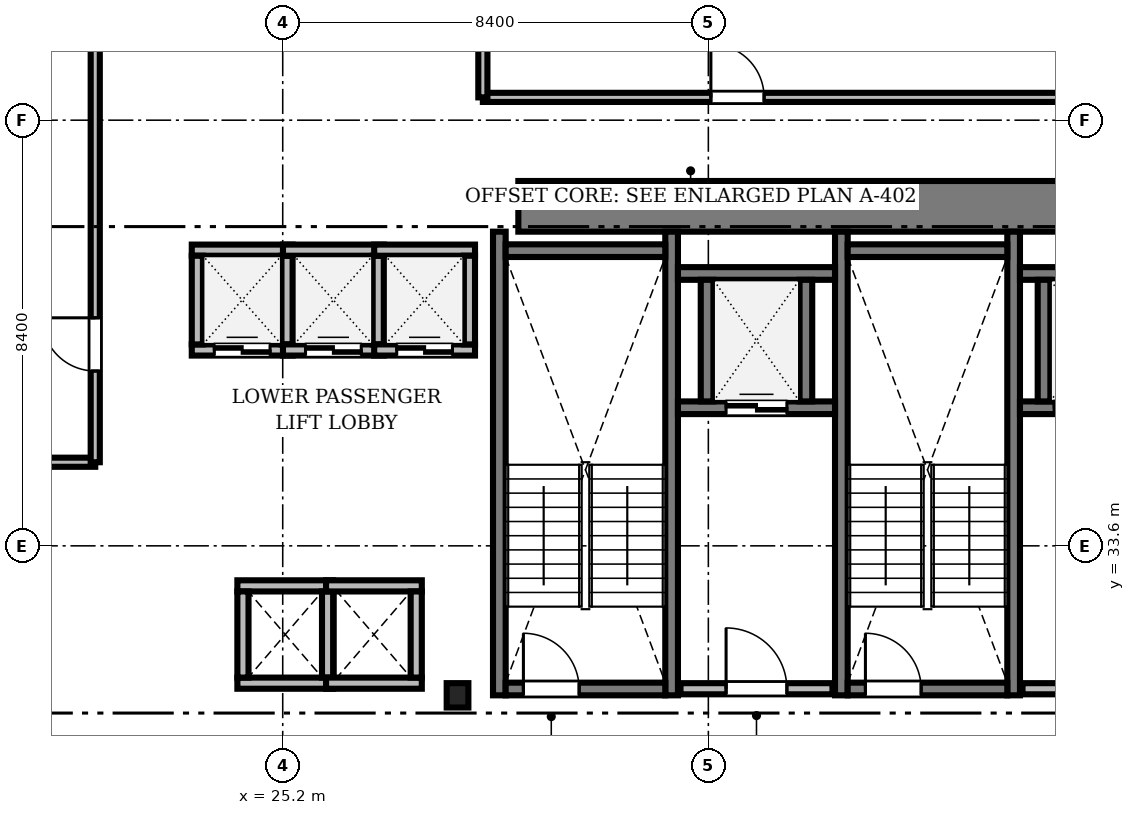
"""IFC4 building model, lengths in metres.
Left out: names, types, materials, properties, quantities, classifications, styles, units other than length and angle.
Written with IfcOpenShell. Run it as: python <this file> out.ifc"""

import sys

from ifc_helpers import new_model, si_unit, direction, frame, frame_2d, origin, origin_2d, place, context, subcontext, project, spatial, rectangle, i_section, extrude, source, transform, mapped, element, fill, save


model = new_model("IFC4")
c1 = context("Model", 3, precision=1e-05, world=origin(), true_north=direction((0.0, 1.0)))
c2 = subcontext(c1, "Body", "Model", "MODEL_VIEW")
j1 = project(units=[si_unit("LENGTHUNIT", "METRE"), si_unit("PLANEANGLEUNIT", "RADIAN")], contexts=[c1])
p1 = place(None, origin())
s1 = spatial("IfcSite", under=j1, at=p1, CompositionType="ELEMENT")
p2 = place(p1, origin())
s2 = spatial("IfcBuilding", under=s1, at=p2, CompositionType="ELEMENT")
p3 = place(p2, frame((0.0, 0.0, 86.0)))
s3 = spatial("IfcBuildingStorey", under=s2, at=p3, CompositionType="ELEMENT", Elevation=86.0)
m1 = source(origin(), c2, "Body", "SweptSolid", [
    extrude(rectangle(XDim=17.52, YDim=1.0, at=frame_2d((8.76, 0.0))), origin(), (0.0, 0.0, 1.0), 3.41),
])
p4 = place(p3, frame((29.85, 40.3, 0.0), z_axis=(0.0, 0.0, 1.0), x_axis=(1.0, 0.0, 0.0)))
e1 = element("IfcWall", 1, at=p4, inside=s3, PredefinedType="SHEAR", context=c2, shape_type="MappedRepresentation", body=[
    mapped(m1, transform((0.0, 0.0, 0.0), scale=1.0)),
])
m2 = source(origin(), c2, "Body", "SweptSolid", [
    extrude(i_section(OverallWidth=0.428, OverallDepth=0.481, WebThickness=0.04, FlangeThickness=0.063, FilletRadius=0.015, at=origin_2d()), origin(), (0.0, 0.0, 1.0), 3.41),
])
p5 = place(p3, frame((28.65, 30.65, 0.0), z_axis=(0.0, 0.0, 1.0), x_axis=(1.0, 0.0, 0.0)))
e2 = element("IfcColumn", 2, at=p5, inside=s3, PredefinedType="COLUMN", context=c2, shape_type="MappedRepresentation", body=[
    mapped(m2, transform((0.0, 0.0, 0.0), scale=1.0)),
])
m3 = source(origin(), c2, "Body", "SweptSolid", [
    extrude(rectangle(XDim=9.15, YDim=0.25, at=frame_2d((4.575, 0.0))), origin(), (0.0, 0.0, 1.0), 3.45),
])
for number, where, z_axis, x_axis in (
    (3, (29.475, 30.65, 0.0), (0.0, 0.0, 1.0), (0.0, 1.0, 0.0)),
    (4, (32.875, 30.65, 0.0), (0.0, 0.0, 1.0), (0.0, 1.0, 0.0)),
):
    element("IfcWall", number, at=place(p3, frame(where, z_axis=z_axis, x_axis=x_axis)), inside=s3, PredefinedType="SOLIDWALL", context=c2, shape_type="MappedRepresentation", body=[
        mapped(m3, transform((0.0, 0.0, 0.0), scale=1.0)),
    ])
m4 = source(origin(), c2, "Body", "SweptSolid", [
    extrude(rectangle(XDim=3.15, YDim=0.25, at=frame_2d((1.575, 0.0))), origin(), (0.0, 0.0, 1.0), 3.45),
])
p6 = place(p3, frame((29.6, 39.425, 0.0), z_axis=(0.0, 0.0, 1.0), x_axis=(1.0, 0.0, 0.0)))
e5 = element("IfcWall", 5, at=p6, inside=s3, PredefinedType="SOLIDWALL", context=c2, shape_type="MappedRepresentation", body=[
    mapped(m4, transform((0.0, 0.0, 0.0), scale=1.0)),
])
p7 = place(p3, frame((29.6, 30.775, 0.0), z_axis=(0.0, 0.0, 1.0), x_axis=(1.0, 0.0, 0.0)))
e6 = element("IfcWall", 6, at=p7, inside=s3, PredefinedType="SOLIDWALL", context=c2, shape_type="MappedRepresentation", body=[
    mapped(m4, transform((0.0, 0.0, 0.0), scale=1.0)),
])
m5 = source(origin(), c2, "Body", "SweptSolid", [
    extrude(rectangle(XDim=1.1, YDim=2.2, at=frame_2d((0.55, 1.1))), frame((0.0, 0.135, 0.0), z_axis=(0.0, -1.0, 0.0), x_axis=(1.0, 0.0, 0.0)), (0.0, 0.0, 1.0), 0.27),
])
p8 = place(p7, frame((0.35, 0.0, 0.0)))
e7 = element("IfcOpeningElement", 7, at=p8, cuts=e6, PredefinedType="OPENING", context=c2, shape_type="MappedRepresentation", body=[
    mapped(m5, transform((0.0, 0.0, 0.0), scale=1.0)),
])
for number, where, z_axis, x_axis in (
    (8, (36.225, 30.65, 0.0), (0.0, 0.0, 1.0), (0.0, 1.0, 0.0)),
    (9, (39.625, 30.65, 0.0), (0.0, 0.0, 1.0), (0.0, 1.0, 0.0)),
):
    element("IfcWall", number, at=place(p3, frame(where, z_axis=z_axis, x_axis=x_axis)), inside=s3, PredefinedType="SOLIDWALL", context=c2, shape_type="MappedRepresentation", body=[
        mapped(m3, transform((0.0, 0.0, 0.0), scale=1.0)),
    ])
p9 = place(p3, frame((36.35, 39.425, 0.0), z_axis=(0.0, 0.0, 1.0), x_axis=(1.0, 0.0, 0.0)))
e10 = element("IfcWall", 10, at=p9, inside=s3, PredefinedType="SOLIDWALL", context=c2, shape_type="MappedRepresentation", body=[
    mapped(m4, transform((0.0, 0.0, 0.0), scale=1.0)),
])
p10 = place(p3, frame((36.35, 30.775, 0.0), z_axis=(0.0, 0.0, 1.0), x_axis=(1.0, 0.0, 0.0)))
e11 = element("IfcWall", 11, at=p10, inside=s3, PredefinedType="SOLIDWALL", context=c2, shape_type="MappedRepresentation", body=[
    mapped(m4, transform((0.0, 0.0, 0.0), scale=1.0)),
])
p11 = place(p10, frame((0.35, 0.0, 0.0)))
e12 = element("IfcOpeningElement", 12, at=p11, cuts=e11, PredefinedType="OPENING", context=c2, shape_type="MappedRepresentation", body=[
    mapped(m5, transform((0.0, 0.0, 0.0), scale=1.0)),
])
m6 = source(origin(), c2, "Body", "SweptSolid", [
    extrude(rectangle(XDim=3.0, YDim=0.22, at=frame_2d((1.5, 0.0))), origin(), (0.0, 0.0, 1.0), 3.41),
])
p12 = place(p3, frame((33.05, 30.78, 0.0), z_axis=(0.0, 0.0, 1.0), x_axis=(1.0, 0.0, 0.0)))
e13 = element("IfcWall", 13, at=p12, inside=s3, PredefinedType="SOLIDWALL", context=c2, shape_type="MappedRepresentation", body=[
    mapped(m6, transform((0.0, 0.0, 0.0), scale=1.0)),
])
m7 = source(origin(), c2, "Body", "SweptSolid", [
    extrude(rectangle(XDim=1.2, YDim=2.2, at=frame_2d((0.6, 1.1))), frame((0.0, 0.12, 0.0), z_axis=(0.0, -1.0, 0.0), x_axis=(1.0, 0.0, 0.0)), (0.0, 0.0, 1.0), 0.24),
])
p13 = place(p12, frame((0.9, 0.0, 0.0)))
e14 = element("IfcOpeningElement", 14, at=p13, cuts=e13, PredefinedType="OPENING", context=c2, shape_type="MappedRepresentation", body=[
    mapped(m7, transform((0.0, 0.0, 0.0), scale=1.0)),
])
m8 = source(origin(), c2, "Body", "SweptSolid", [
    extrude(rectangle(XDim=2.8, YDim=0.22, at=frame_2d((1.4, 0.0))), origin(), (0.0, 0.0, 1.0), 3.41),
])
p14 = place(p3, frame((39.8, 30.78, 0.0), z_axis=(0.0, 0.0, 1.0), x_axis=(1.0, 0.0, 0.0)))
e15 = element("IfcWall", 15, at=p14, inside=s3, PredefinedType="SOLIDWALL", context=c2, shape_type="MappedRepresentation", body=[
    mapped(m8, transform((0.0, 0.0, 0.0), scale=1.0)),
])
p15 = place(p14, frame((0.8, 0.0, 0.0)))
e16 = element("IfcOpeningElement", 16, at=p15, cuts=e15, PredefinedType="OPENING", context=c2, shape_type="MappedRepresentation", body=[
    mapped(m7, transform((0.0, 0.0, 0.0), scale=1.0)),
])
m9 = source(origin(), c2, "Body", "SweptSolid", [
    extrude(rectangle(XDim=1.99, YDim=0.22, at=frame_2d((0.995, 0.0))), origin(), (0.0, 0.0, 1.0), 3.41),
])
p16 = place(p3, frame((23.405, 37.465, 0.0), z_axis=(0.0, 0.0, 1.0), x_axis=(1.0, 0.0, 0.0)))
e17 = element("IfcWall", 17, at=p16, inside=s3, PredefinedType="SOLIDWALL", context=c2, shape_type="MappedRepresentation", body=[
    mapped(m9, transform((0.0, 0.0, 0.0), scale=1.0)),
])
m10 = source(origin(), c2, "Body", "SweptSolid", [
    extrude(rectangle(XDim=1.1, YDim=2.2, at=frame_2d((0.55, 1.1))), frame((0.0, 0.12, 0.0), z_axis=(0.0, -1.0, 0.0), x_axis=(1.0, 0.0, 0.0)), (0.0, 0.0, 1.0), 0.24),
])
p17 = place(p16, frame((0.445, 0.0, 0.0)))
e18 = element("IfcOpeningElement", 18, at=p17, cuts=e17, PredefinedType="OPENING", context=c2, shape_type="MappedRepresentation", body=[
    mapped(m10, transform((0.0, 0.0, 0.0), scale=1.0)),
])
p18 = place(p3, frame((23.405, 39.435, 0.0), z_axis=(0.0, 0.0, 1.0), x_axis=(1.0, 0.0, 0.0)))
e19 = element("IfcWall", 19, at=p18, inside=s3, PredefinedType="SOLIDWALL", context=c2, shape_type="MappedRepresentation", body=[
    mapped(m9, transform((0.0, 0.0, 0.0), scale=1.0)),
])
m11 = source(origin(), c2, "Body", "SweptSolid", [
    extrude(rectangle(XDim=1.75, YDim=0.22, at=frame_2d((0.875, 0.0))), origin(), (0.0, 0.0, 1.0), 3.41),
])
for number, where, z_axis, x_axis in (
    (20, (23.515, 37.575, 0.0), (0.0, 0.0, 1.0), (0.0, 1.0, 0.0)),
    (21, (25.285, 37.575, 0.0), (0.0, 0.0, 1.0), (0.0, 1.0, 0.0)),
):
    element("IfcWall", number, at=place(p3, frame(where, z_axis=z_axis, x_axis=x_axis)), inside=s3, PredefinedType="SOLIDWALL", context=c2, shape_type="MappedRepresentation", body=[
        mapped(m11, transform((0.0, 0.0, 0.0), scale=1.0)),
    ])
p19 = place(p3, frame((25.205, 37.465, 0.0), z_axis=(0.0, 0.0, 1.0), x_axis=(1.0, 0.0, 0.0)))
e22 = element("IfcWall", 22, at=p19, inside=s3, PredefinedType="SOLIDWALL", context=c2, shape_type="MappedRepresentation", body=[
    mapped(m9, transform((0.0, 0.0, 0.0), scale=1.0)),
])
p20 = place(p19, frame((0.445, 0.0, 0.0)))
e23 = element("IfcOpeningElement", 23, at=p20, cuts=e22, PredefinedType="OPENING", context=c2, shape_type="MappedRepresentation", body=[
    mapped(m10, transform((0.0, 0.0, 0.0), scale=1.0)),
])
p21 = place(p3, frame((25.205, 39.435, 0.0), z_axis=(0.0, 0.0, 1.0), x_axis=(1.0, 0.0, 0.0)))
e24 = element("IfcWall", 24, at=p21, inside=s3, PredefinedType="SOLIDWALL", context=c2, shape_type="MappedRepresentation", body=[
    mapped(m9, transform((0.0, 0.0, 0.0), scale=1.0)),
])
p22 = place(p3, frame((27.085, 37.575, 0.0), z_axis=(0.0, 0.0, 1.0), x_axis=(0.0, 1.0, 0.0)))
e25 = element("IfcWall", 25, at=p22, inside=s3, PredefinedType="SOLIDWALL", context=c2, shape_type="MappedRepresentation", body=[
    mapped(m11, transform((0.0, 0.0, 0.0), scale=1.0)),
])
m12 = source(origin(), c2, "Body", "SweptSolid", [
    extrude(rectangle(XDim=1.99, YDim=0.22, at=frame_2d((0.995, 0.0))), origin(), (0.0, 0.0, 1.0), 3.41),
])
p23 = place(p3, frame((27.005, 37.465, 0.0), z_axis=(0.0, 0.0, 1.0), x_axis=(1.0, 0.0, 0.0)))
e26 = element("IfcWall", 26, at=p23, inside=s3, PredefinedType="SOLIDWALL", context=c2, shape_type="MappedRepresentation", body=[
    mapped(m12, transform((0.0, 0.0, 0.0), scale=1.0)),
])
p24 = place(p23, frame((0.445, 0.0, 0.0)))
e27 = element("IfcOpeningElement", 27, at=p24, cuts=e26, PredefinedType="OPENING", context=c2, shape_type="MappedRepresentation", body=[
    mapped(m10, transform((0.0, 0.0, 0.0), scale=1.0)),
])
p25 = place(p3, frame((27.005, 39.435, 0.0), z_axis=(0.0, 0.0, 1.0), x_axis=(1.0, 0.0, 0.0)))
e28 = element("IfcWall", 28, at=p25, inside=s3, PredefinedType="SOLIDWALL", context=c2, shape_type="MappedRepresentation", body=[
    mapped(m12, transform((0.0, 0.0, 0.0), scale=1.0)),
])
p26 = place(p3, frame((28.885, 37.575, 0.0), z_axis=(0.0, 0.0, 1.0), x_axis=(0.0, 1.0, 0.0)))
e29 = element("IfcWall", 29, at=p26, inside=s3, PredefinedType="SOLIDWALL", context=c2, shape_type="MappedRepresentation", body=[
    mapped(m11, transform((0.0, 0.0, 0.0), scale=1.0)),
])
m13 = source(origin(), c2, "Body", "SweptSolid", [
    extrude(rectangle(XDim=3.1, YDim=0.25, at=frame_2d((1.55, 0.0))), origin(), (0.0, 0.0, 1.0), 3.41),
])
p27 = place(p3, frame((33.0, 36.325, 0.0), z_axis=(0.0, 0.0, 1.0), x_axis=(1.0, 0.0, 0.0)))
e30 = element("IfcWall", 30, at=p27, inside=s3, PredefinedType="SOLIDWALL", context=c2, shape_type="MappedRepresentation", body=[
    mapped(m13, transform((0.0, 0.0, 0.0), scale=1.0)),
])
m14 = source(origin(), c2, "Body", "SweptSolid", [
    extrude(rectangle(XDim=1.2, YDim=2.25, at=frame_2d((0.6, 1.125))), frame((0.0, 0.135, 0.0), z_axis=(0.0, -1.0, 0.0), x_axis=(1.0, 0.0, 0.0)), (0.0, 0.0, 1.0), 0.27),
])
p28 = place(p27, frame((0.95, 0.0, 0.0)))
e31 = element("IfcOpeningElement", 31, at=p28, cuts=e30, PredefinedType="OPENING", context=c2, shape_type="MappedRepresentation", body=[
    mapped(m14, transform((0.0, 0.0, 0.0), scale=1.0)),
])
p29 = place(p3, frame((33.0, 38.975, 0.0), z_axis=(0.0, 0.0, 1.0), x_axis=(1.0, 0.0, 0.0)))
e32 = element("IfcWall", 32, at=p29, inside=s3, PredefinedType="SOLIDWALL", context=c2, shape_type="MappedRepresentation", body=[
    mapped(m13, transform((0.0, 0.0, 0.0), scale=1.0)),
])
m15 = source(origin(), c2, "Body", "SweptSolid", [
    extrude(rectangle(XDim=2.4, YDim=0.25, at=frame_2d((1.2, 0.0))), origin(), (0.0, 0.0, 1.0), 3.41),
])
for number, where, z_axis, x_axis in (
    (33, (33.575, 36.45, 0.0), (0.0, 0.0, 1.0), (0.0, 1.0, 0.0)),
    (34, (35.525, 36.45, 0.0), (0.0, 0.0, 1.0), (0.0, 1.0, 0.0)),
):
    element("IfcWall", number, at=place(p3, frame(where, z_axis=z_axis, x_axis=x_axis)), inside=s3, PredefinedType="SOLIDWALL", context=c2, shape_type="MappedRepresentation", body=[
        mapped(m15, transform((0.0, 0.0, 0.0), scale=1.0)),
    ])
m16 = source(origin(), c2, "Body", "SweptSolid", [
    extrude(rectangle(XDim=2.55, YDim=0.25, at=frame_2d((1.275, 0.0))), origin(), (0.0, 0.0, 1.0), 3.41),
])
p30 = place(p3, frame((39.75, 36.325, 0.0), z_axis=(0.0, 0.0, 1.0), x_axis=(1.0, 0.0, 0.0)))
e35 = element("IfcWall", 35, at=p30, inside=s3, PredefinedType="SOLIDWALL", context=c2, shape_type="MappedRepresentation", body=[
    mapped(m16, transform((0.0, 0.0, 0.0), scale=1.0)),
])
p31 = place(p30, frame((0.675, 0.0, 0.0)))
e36 = element("IfcOpeningElement", 36, at=p31, cuts=e35, PredefinedType="OPENING", context=c2, shape_type="MappedRepresentation", body=[
    mapped(m14, transform((0.0, 0.0, 0.0), scale=1.0)),
])
p32 = place(p3, frame((39.75, 38.975, 0.0), z_axis=(0.0, 0.0, 1.0), x_axis=(1.0, 0.0, 0.0)))
e37 = element("IfcWall", 37, at=p32, inside=s3, PredefinedType="SOLIDWALL", context=c2, shape_type="MappedRepresentation", body=[
    mapped(m16, transform((0.0, 0.0, 0.0), scale=1.0)),
])
p33 = place(p3, frame((40.225, 36.45, 0.0), z_axis=(0.0, 0.0, 1.0), x_axis=(0.0, 1.0, 0.0)))
e38 = element("IfcWall", 38, at=p33, inside=s3, PredefinedType="SOLIDWALL", context=c2, shape_type="MappedRepresentation", body=[
    mapped(m15, transform((0.0, 0.0, 0.0), scale=1.0)),
])
m17 = source(origin(), c2, "Body", "SweptSolid", [
    extrude(rectangle(XDim=1.89, YDim=0.22, at=frame_2d((0.945, 0.0))), origin(), (0.0, 0.0, 1.0), 3.41),
])
for number, where, z_axis, x_axis in (
    (39, (24.305, 30.89, 0.0), (0.0, 0.0, 1.0), (1.0, 0.0, 0.0)),
    (40, (24.305, 32.81, 0.0), (0.0, 0.0, 1.0), (1.0, 0.0, 0.0)),
):
    element("IfcWall", number, at=place(p3, frame(where, z_axis=z_axis, x_axis=x_axis)), inside=s3, PredefinedType="SOLIDWALL", context=c2, shape_type="MappedRepresentation", body=[
        mapped(m17, transform((0.0, 0.0, 0.0), scale=1.0)),
    ])
m18 = source(origin(), c2, "Body", "SweptSolid", [
    extrude(rectangle(XDim=1.7, YDim=0.22, at=frame_2d((0.85, 0.0))), origin(), (0.0, 0.0, 1.0), 3.41),
])
for number, where, z_axis, x_axis in (
    (41, (24.415, 31.0, 0.0), (0.0, 0.0, 1.0), (0.0, 1.0, 0.0)),
    (42, (26.085, 31.0, 0.0), (0.0, 0.0, 1.0), (0.0, 1.0, 0.0)),
):
    element("IfcWall", number, at=place(p3, frame(where, z_axis=z_axis, x_axis=x_axis)), inside=s3, PredefinedType="SOLIDWALL", context=c2, shape_type="MappedRepresentation", body=[
        mapped(m18, transform((0.0, 0.0, 0.0), scale=1.0)),
    ])
for number, where, z_axis, x_axis in (
    (43, (26.055, 30.89, 0.0), (0.0, 0.0, 1.0), (1.0, 0.0, 0.0)),
    (44, (26.055, 32.81, 0.0), (0.0, 0.0, 1.0), (1.0, 0.0, 0.0)),
):
    element("IfcWall", number, at=place(p3, frame(where, z_axis=z_axis, x_axis=x_axis)), inside=s3, PredefinedType="SOLIDWALL", context=c2, shape_type="MappedRepresentation", body=[
        mapped(m17, transform((0.0, 0.0, 0.0), scale=1.0)),
    ])
p34 = place(p3, frame((27.835, 31.0, 0.0), z_axis=(0.0, 0.0, 1.0), x_axis=(0.0, 1.0, 0.0)))
e45 = element("IfcWall", 45, at=p34, inside=s3, PredefinedType="SOLIDWALL", context=c2, shape_type="MappedRepresentation", body=[
    mapped(m18, transform((0.0, 0.0, 0.0), scale=1.0)),
])
m19 = source(origin(), c2, "Body", "SweptSolid", [
    extrude(rectangle(XDim=19.428, YDim=0.18, at=frame_2d((9.714, 0.0))), origin(), (0.0, 0.0, 1.0), 2.652),
])
p35 = place(p3, frame((29.15, 42.45, 0.0), z_axis=(0.0, 0.0, 1.0), x_axis=(1.0, 0.0, 0.0)))
e46 = element("IfcWall", 46, at=p35, inside=s3, PredefinedType="PARTITIONING", context=c2, shape_type="MappedRepresentation", body=[
    mapped(m19, transform((0.0, 0.0, 0.0), scale=1.0)),
])
m20 = source(origin(), c2, "Body", "SweptSolid", [
    extrude(rectangle(XDim=1.05, YDim=2.2, at=frame_2d((0.525, 1.1))), frame((0.0, 0.1, 0.0), z_axis=(0.0, -1.0, 0.0), x_axis=(1.0, 0.0, 0.0)), (0.0, 0.0, 1.0), 0.2),
])
p36 = place(p35, frame((4.5, 0.0, 0.0)))
e47 = element("IfcOpeningElement", 47, at=p36, cuts=e46, PredefinedType="OPENING", context=c2, shape_type="MappedRepresentation", body=[
    mapped(m20, transform((0.0, 0.0, 0.0), scale=1.0)),
])
m21 = source(origin(), c2, "Body", "SweptSolid", [
    extrude(rectangle(XDim=19.078, YDim=0.18, at=frame_2d((9.539, 0.0))), origin(), (0.0, 0.0, 1.0), 2.652),
])
p37 = place(p3, frame((2.422, 35.25, 0.0), z_axis=(0.0, 0.0, 1.0), x_axis=(1.0, 0.0, 0.0)))
e48 = element("IfcWall", 48, at=p37, inside=s3, PredefinedType="PARTITIONING", context=c2, shape_type="MappedRepresentation", body=[
    mapped(m21, transform((0.0, 0.0, 0.0), scale=1.0)),
])
p38 = place(p37, frame((14.843, 0.0, 0.0)))
e49 = element("IfcOpeningElement", 49, at=p38, cuts=e48, PredefinedType="OPENING", context=c2, shape_type="MappedRepresentation", body=[
    mapped(m20, transform((0.0, 0.0, 0.0), scale=1.0)),
])
m22 = source(origin(), c2, "Body", "SweptSolid", [
    extrude(rectangle(XDim=13.028, YDim=0.18, at=frame_2d((6.514, 0.0))), origin(), (0.0, 0.0, 1.0), 2.652),
])
p39 = place(p3, frame((21.5, 35.25, 0.0), z_axis=(0.0, 0.0, 1.0), x_axis=(0.0, 1.0, 0.0)))
e50 = element("IfcWall", 50, at=p39, inside=s3, PredefinedType="PARTITIONING", context=c2, shape_type="MappedRepresentation", body=[
    mapped(m22, transform((0.0, 0.0, 0.0), scale=1.0)),
])
p40 = place(p39, frame((1.8, 0.0, 0.0)))
e51 = element("IfcOpeningElement", 51, at=p40, cuts=e50, PredefinedType="OPENING", context=c2, shape_type="MappedRepresentation", body=[
    mapped(m20, transform((0.0, 0.0, 0.0), scale=1.0)),
])
m23 = source(origin(), c2, "Body", "SweptSolid", [
    extrude(rectangle(XDim=5.828, YDim=0.18, at=frame_2d((2.914, 0.0))), origin(), (0.0, 0.0, 1.0), 2.652),
])
p41 = place(p3, frame((29.15, 42.45, 0.0), z_axis=(0.0, 0.0, 1.0), x_axis=(0.0, 1.0, 0.0)))
e52 = element("IfcWall", 52, at=p41, inside=s3, PredefinedType="PARTITIONING", context=c2, shape_type="MappedRepresentation", body=[
    mapped(m23, transform((0.0, 0.0, 0.0), scale=1.0)),
])
m24 = source(origin(), c2, "Body", "SweptSolid", [
    extrude(rectangle(XDim=1.1, YDim=2.2, at=frame_2d((0.55, 1.1))), frame((0.0, 0.025, 0.0), z_axis=(0.0, -1.0, 0.0), x_axis=(1.0, 0.0, 0.0)), (0.0, 0.0, 1.0), 0.05),
])
p42 = place(p8, origin())
e53 = element("IfcDoor", 53, at=p42, inside=s3, OperationType="SINGLE_SWING_LEFT", PredefinedType="DOOR", context=c2, shape_type="MappedRepresentation", body=[
    mapped(m24, transform((0.0, 0.0, 0.0), scale=1.0)),
])
fill(e7, e53)
p43 = place(p11, origin())
e54 = element("IfcDoor", 54, at=p43, inside=s3, OperationType="SINGLE_SWING_LEFT", PredefinedType="DOOR", context=c2, shape_type="MappedRepresentation", body=[
    mapped(m24, transform((0.0, 0.0, 0.0), scale=1.0)),
])
fill(e12, e54)
m25 = source(origin(), c2, "Body", "SweptSolid", [
    extrude(rectangle(XDim=1.2, YDim=2.2, at=frame_2d((0.6, 1.1))), frame((0.0, 0.025, 0.0), z_axis=(0.0, -1.0, 0.0), x_axis=(1.0, 0.0, 0.0)), (0.0, 0.0, 1.0), 0.05),
])
p44 = place(p13, origin())
e55 = element("IfcDoor", 55, at=p44, inside=s3, OperationType="SINGLE_SWING_LEFT", PredefinedType="DOOR", context=c2, shape_type="MappedRepresentation", body=[
    mapped(m25, transform((0.0, 0.0, 0.0), scale=1.0)),
])
fill(e14, e55)
p45 = place(p17, origin())
e56 = element("IfcDoor", 56, at=p45, inside=s3, OperationType="DOUBLE_DOOR_SLIDING", PredefinedType="DOOR", context=c2, shape_type="MappedRepresentation", body=[
    mapped(m24, transform((0.0, 0.0, 0.0), scale=1.0)),
])
fill(e18, e56)
p46 = place(p20, origin())
e57 = element("IfcDoor", 57, at=p46, inside=s3, OperationType="DOUBLE_DOOR_SLIDING", PredefinedType="DOOR", context=c2, shape_type="MappedRepresentation", body=[
    mapped(m24, transform((0.0, 0.0, 0.0), scale=1.0)),
])
fill(e23, e57)
p47 = place(p24, origin())
e58 = element("IfcDoor", 58, at=p47, inside=s3, OperationType="DOUBLE_DOOR_SLIDING", PredefinedType="DOOR", context=c2, shape_type="MappedRepresentation", body=[
    mapped(m24, transform((0.0, 0.0, 0.0), scale=1.0)),
])
fill(e27, e58)
m26 = source(origin(), c2, "Body", "SweptSolid", [
    extrude(rectangle(XDim=1.2, YDim=2.25, at=frame_2d((0.6, 1.125))), frame((0.0, 0.025, 0.0), z_axis=(0.0, -1.0, 0.0), x_axis=(1.0, 0.0, 0.0)), (0.0, 0.0, 1.0), 0.05),
])
p48 = place(p28, origin())
e59 = element("IfcDoor", 59, at=p48, inside=s3, OperationType="DOUBLE_DOOR_SLIDING", PredefinedType="DOOR", context=c2, shape_type="MappedRepresentation", body=[
    mapped(m26, transform((0.0, 0.0, 0.0), scale=1.0)),
])
fill(e31, e59)
p49 = place(p31, origin())
e60 = element("IfcDoor", 60, at=p49, inside=s3, OperationType="DOUBLE_DOOR_SLIDING", PredefinedType="DOOR", context=c2, shape_type="MappedRepresentation", body=[
    mapped(m26, transform((0.0, 0.0, 0.0), scale=1.0)),
])
fill(e36, e60)
m27 = source(origin(), c2, "Body", "SweptSolid", [
    extrude(rectangle(XDim=1.05, YDim=2.2, at=frame_2d((0.525, 1.1))), frame((0.0, 0.025, 0.0), z_axis=(0.0, -1.0, 0.0), x_axis=(1.0, 0.0, 0.0)), (0.0, 0.0, 1.0), 0.05),
])
p50 = place(p36, origin())
e61 = element("IfcDoor", 61, at=p50, inside=s3, OperationType="SINGLE_SWING_LEFT", PredefinedType="DOOR", context=c2, shape_type="MappedRepresentation", body=[
    mapped(m27, transform((0.0, 0.0, 0.0), scale=1.0)),
])
fill(e47, e61)
p51 = place(p40, origin())
e62 = element("IfcDoor", 62, at=p51, inside=s3, OperationType="SINGLE_SWING_RIGHT", PredefinedType="DOOR", context=c2, shape_type="MappedRepresentation", body=[
    mapped(m27, transform((0.0, 0.0, 0.0), scale=1.0)),
])
fill(e51, e62)
save(model, sys.argv[1])
